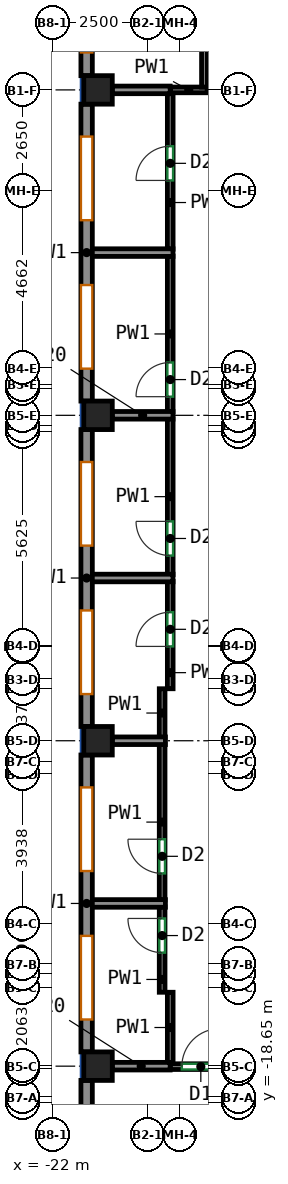
"""IFC4 building model, lengths in metres.
Left out: names, types, materials, properties, quantities, classifications, styles, units other than length and angle.
Written with IfcOpenShell. Run it as: python <this file> out.ifc"""

import sys

from ifc_helpers import new_model, si_unit, direction, frame, frame_2d, origin, origin_2d, place, context, subcontext, project, spatial, rectangle, extrude, source, transform, mapped, element, fill, save


model = new_model("IFC4")
c1 = context("Model", 3, precision=1e-05, world=origin(), true_north=direction((0.0, 1.0)))
c2 = subcontext(c1, "Body", "Model", "MODEL_VIEW")
j1 = project(units=[si_unit("LENGTHUNIT", "METRE"), si_unit("PLANEANGLEUNIT", "RADIAN")], contexts=[c1])
p1 = place(None, origin())
s1 = spatial("IfcSite", under=j1, at=p1, CompositionType="ELEMENT")
p2 = place(p1, origin())
s2 = spatial("IfcBuilding", under=s1, at=p2, CompositionType="ELEMENT")
p3 = place(p2, frame((0.0, 0.0, 213.5)))
s3 = spatial("IfcBuildingStorey", under=s2, at=p3, CompositionType="ELEMENT", Elevation=213.5)
m1 = source(origin(), c2, "Body", "SweptSolid", [
    extrude(rectangle(XDim=0.75, YDim=0.75, at=origin_2d()), origin(), (0.0, 0.0, 1.0), 3.12),
])
for number, where, z_axis, x_axis in (
    (1, (-20.8, -17.688, 0.0), (0.0, 0.0, 1.0), (1.0, 0.0, 0.0)),
    (2, (-20.8, -9.125, 0.0), (0.0, 0.0, 1.0), (1.0, 0.0, 0.0)),
    (3, (-20.8, -0.562, 0.0), (0.0, 0.0, 1.0), (1.0, 0.0, 0.0)),
    (4, (-20.8, 8.0, 0.0), (0.0, 0.0, 1.0), (1.0, 0.0, 0.0)),
):
    element("IfcColumn", number, at=place(p3, frame(where, z_axis=z_axis, x_axis=x_axis)), inside=s3, PredefinedType="COLUMN", context=c2, shape_type="MappedRepresentation", body=[
        mapped(m1, transform((0.0, 0.0, 0.0))),
    ])
m2 = source(origin(), c2, "Body", "SweptSolid", [
    extrude(rectangle(XDim=13.682, YDim=0.3, at=frame_2d((6.841, 0.0))), origin(), (0.0, 0.0, 1.0), 3.12),
])
p4 = place(p3, frame((-21.1, 22.057, 0.0), z_axis=(0.0, 0.0, 1.0), x_axis=(0.0, -1.0, 0.0)))
e5 = element("IfcWall", 5, at=p4, inside=s3, PredefinedType="SOLIDWALL", context=c2, shape_type="MappedRepresentation", body=[
    mapped(m2, transform((0.0, 0.0, 0.0))),
])
p5 = place(p4, frame((0.61, 0.0, 0.85)))
e6 = element("IfcOpeningElement", 6, at=p5, cuts=e5, PredefinedType="OPENING", context=c2, shape_type="SweptSolid", body=[
    extrude(rectangle(XDim=2.2, YDim=1.95, at=frame_2d((1.1, 0.975))), frame((0.0, 0.16, 0.0), z_axis=(0.0, -1.0, 0.0), x_axis=(1.0, 0.0, 0.0)), (0.0, 0.0, 1.0), 0.32),
])
p6 = place(p4, frame((4.031, 0.0, 0.85)))
e7 = element("IfcOpeningElement", 7, at=p6, cuts=e5, PredefinedType="OPENING", context=c2, shape_type="SweptSolid", body=[
    extrude(rectangle(XDim=2.2, YDim=1.95, at=frame_2d((1.1, 0.975))), frame((0.0, 0.16, 0.0), z_axis=(0.0, -1.0, 0.0), x_axis=(1.0, 0.0, 0.0)), (0.0, 0.0, 1.0), 0.32),
])
p7 = place(p4, frame((7.451, 0.0, 0.85)))
e8 = element("IfcOpeningElement", 8, at=p7, cuts=e5, PredefinedType="OPENING", context=c2, shape_type="SweptSolid", body=[
    extrude(rectangle(XDim=2.2, YDim=1.95, at=frame_2d((1.1, 0.975))), frame((0.0, 0.16, 0.0), z_axis=(0.0, -1.0, 0.0), x_axis=(1.0, 0.0, 0.0)), (0.0, 0.0, 1.0), 0.32),
])
p8 = place(p4, frame((10.872, 0.0, 0.85)))
e9 = element("IfcOpeningElement", 9, at=p8, cuts=e5, PredefinedType="OPENING", context=c2, shape_type="SweptSolid", body=[
    extrude(rectangle(XDim=2.2, YDim=1.95, at=frame_2d((1.1, 0.975))), frame((0.0, 0.16, 0.0), z_axis=(0.0, -1.0, 0.0), x_axis=(1.0, 0.0, 0.0)), (0.0, 0.0, 1.0), 0.32),
])
m3 = source(origin(), c2, "Body", "SweptSolid", [
    extrude(rectangle(XDim=7.812, YDim=0.3, at=frame_2d((3.906, 0.0))), origin(), (0.0, 0.0, 1.0), 3.12),
])
p9 = place(p3, frame((-21.1, 7.625, 0.0), z_axis=(0.0, 0.0, 1.0), x_axis=(0.0, -1.0, 0.0)))
e10 = element("IfcWall", 10, at=p9, inside=s3, PredefinedType="SOLIDWALL", context=c2, shape_type="MappedRepresentation", body=[
    mapped(m3, transform((0.0, 0.0, 0.0))),
])
p10 = place(p9, frame((0.853, 0.0, 0.85)))
e11 = element("IfcOpeningElement", 11, at=p10, cuts=e10, PredefinedType="OPENING", context=c2, shape_type="SweptSolid", body=[
    extrude(rectangle(XDim=2.2, YDim=1.95, at=frame_2d((1.1, 0.975))), frame((0.0, 0.16, 0.0), z_axis=(0.0, -1.0, 0.0), x_axis=(1.0, 0.0, 0.0)), (0.0, 0.0, 1.0), 0.32),
])
p11 = place(p9, frame((4.759, 0.0, 0.85)))
e12 = element("IfcOpeningElement", 12, at=p11, cuts=e10, PredefinedType="OPENING", context=c2, shape_type="SweptSolid", body=[
    extrude(rectangle(XDim=2.2, YDim=1.95, at=frame_2d((1.1, 0.975))), frame((0.0, 0.16, 0.0), z_axis=(0.0, -1.0, 0.0), x_axis=(1.0, 0.0, 0.0)), (0.0, 0.0, 1.0), 0.32),
])
p12 = place(p3, frame((-21.1, -0.938, 0.0), z_axis=(0.0, 0.0, 1.0), x_axis=(0.0, -1.0, 0.0)))
e13 = element("IfcWall", 13, at=p12, inside=s3, PredefinedType="SOLIDWALL", context=c2, shape_type="MappedRepresentation", body=[
    mapped(m3, transform((0.0, 0.0, 0.0))),
])
p13 = place(p12, frame((0.853, 0.0, 0.85)))
e14 = element("IfcOpeningElement", 14, at=p13, cuts=e13, PredefinedType="OPENING", context=c2, shape_type="SweptSolid", body=[
    extrude(rectangle(XDim=2.2, YDim=1.95, at=frame_2d((1.1, 0.975))), frame((0.0, 0.16, 0.0), z_axis=(0.0, -1.0, 0.0), x_axis=(1.0, 0.0, 0.0)), (0.0, 0.0, 1.0), 0.32),
])
p14 = place(p12, frame((4.76, 0.0, 0.85)))
e15 = element("IfcOpeningElement", 15, at=p14, cuts=e13, PredefinedType="OPENING", context=c2, shape_type="SweptSolid", body=[
    extrude(rectangle(XDim=2.2, YDim=1.95, at=frame_2d((1.1, 0.975))), frame((0.0, 0.16, 0.0), z_axis=(0.0, -1.0, 0.0), x_axis=(1.0, 0.0, 0.0)), (0.0, 0.0, 1.0), 0.32),
])
p15 = place(p3, frame((-21.1, -9.5, 0.0), z_axis=(0.0, 0.0, 1.0), x_axis=(0.0, -1.0, 0.0)))
e16 = element("IfcWall", 16, at=p15, inside=s3, PredefinedType="SOLIDWALL", context=c2, shape_type="MappedRepresentation", body=[
    mapped(m3, transform((0.0, 0.0, 0.0))),
])
p16 = place(p15, frame((0.853, 0.0, 0.85)))
e17 = element("IfcOpeningElement", 17, at=p16, cuts=e16, PredefinedType="OPENING", context=c2, shape_type="SweptSolid", body=[
    extrude(rectangle(XDim=2.2, YDim=1.95, at=frame_2d((1.1, 0.975))), frame((0.0, 0.16, 0.0), z_axis=(0.0, -1.0, 0.0), x_axis=(1.0, 0.0, 0.0)), (0.0, 0.0, 1.0), 0.32),
])
p17 = place(p15, frame((4.759, 0.0, 0.85)))
e18 = element("IfcOpeningElement", 18, at=p17, cuts=e16, PredefinedType="OPENING", context=c2, shape_type="SweptSolid", body=[
    extrude(rectangle(XDim=2.2, YDim=1.95, at=frame_2d((1.1, 0.975))), frame((0.0, 0.16, 0.0), z_axis=(0.0, -1.0, 0.0), x_axis=(1.0, 0.0, 0.0)), (0.0, 0.0, 1.0), 0.32),
])
m4 = source(origin(), c2, "Body", "SweptSolid", [
    extrude(rectangle(XDim=4.312, YDim=0.3, at=frame_2d((2.156, 0.0))), origin(), (0.0, 0.0, 1.0), 3.12),
])
p18 = place(p3, frame((-21.1, -18.062, 0.0), z_axis=(0.0, 0.0, 1.0), x_axis=(0.0, -1.0, 0.0)))
e19 = element("IfcWall", 19, at=p18, inside=s3, PredefinedType="SOLIDWALL", context=c2, shape_type="MappedRepresentation", body=[
    mapped(m4, transform((0.0, 0.0, 0.0))),
])
p19 = place(p18, frame((1.056, 0.0, 0.85)))
e20 = element("IfcOpeningElement", 20, at=p19, cuts=e19, PredefinedType="OPENING", context=c2, shape_type="SweptSolid", body=[
    extrude(rectangle(XDim=2.2, YDim=1.95, at=frame_2d((1.1, 0.975))), frame((0.0, 0.16, 0.0), z_axis=(0.0, -1.0, 0.0), x_axis=(1.0, 0.0, 0.0)), (0.0, 0.0, 1.0), 0.32),
])
p20 = place(p3, frame((-18.9, -17.7, 0.0), z_axis=(0.0, 0.0, 1.0), x_axis=(1.0, 0.0, 0.0)))
e21 = element("IfcWall", 21, at=p20, inside=s3, PredefinedType="PARTITIONING", context=c2, shape_type="SweptSolid", body=[
    extrude(rectangle(XDim=8.233, YDim=0.15, at=frame_2d((4.116, 0.0))), origin(), (0.0, 0.0, 1.0), 2.52),
])
p21 = place(p20, frame((0.305, 0.0, 0.0)))
e22 = element("IfcOpeningElement", 22, at=p21, cuts=e21, PredefinedType="OPENING", context=c2, shape_type="SweptSolid", body=[
    extrude(rectangle(XDim=1.0, YDim=2.1, at=frame_2d((0.5, 1.05))), frame((0.0, 0.085, 0.0), z_axis=(0.0, -1.0, 0.0), x_axis=(1.0, 0.0, 0.0)), (0.0, 0.0, 1.0), 0.17),
])
p22 = place(p20, frame((5.143, 0.0, 0.0)))
e23 = element("IfcOpeningElement", 23, at=p22, cuts=e21, PredefinedType="OPENING", context=c2, shape_type="SweptSolid", body=[
    extrude(rectangle(XDim=1.0, YDim=2.1, at=frame_2d((0.5, 1.05))), frame((0.0, 0.085, 0.0), z_axis=(0.0, -1.0, 0.0), x_axis=(1.0, 0.0, 0.0)), (0.0, 0.0, 1.0), 0.17),
])
p23 = place(p3, frame((-17.925, 8.0, 0.0), z_axis=(0.0, 0.0, 1.0), x_axis=(-1.0, 0.0, 0.0)))
e24 = element("IfcWall", 24, at=p23, inside=s3, PredefinedType="PARTITIONING", context=c2, shape_type="SweptSolid", body=[
    extrude(rectangle(XDim=0.976, YDim=0.15, at=frame_2d((0.488, 0.0))), origin(), (0.0, 0.0, 1.0), 3.12),
])
p24 = place(p3, frame((-18.0, 21.9, 0.0), z_axis=(0.0, 0.0, 1.0), x_axis=(0.0, -1.0, 0.0)))
e25 = element("IfcWall", 25, at=p24, inside=s3, PredefinedType="PARTITIONING", context=c2, shape_type="SweptSolid", body=[
    extrude(rectangle(XDim=13.825, YDim=0.15, at=frame_2d((6.913, 0.0))), origin(), (0.0, 0.0, 1.0), 3.12),
])
p25 = place(p24, frame((10.521, 0.0, 0.0)))
e26 = element("IfcOpeningElement", 26, at=p25, cuts=e25, PredefinedType="OPENING", context=c2, shape_type="SweptSolid", body=[
    extrude(rectangle(XDim=0.9, YDim=2.1, at=frame_2d((0.45, 1.05))), frame((0.0, 0.085, 0.0), z_axis=(0.0, -1.0, 0.0), x_axis=(1.0, 0.0, 0.0)), (0.0, 0.0, 1.0), 0.17),
])
p26 = place(p3, frame((-18.9, -17.598, 0.0), z_axis=(0.0, 0.0, 1.0), x_axis=(0.0, 1.0, 0.0)))
e27 = element("IfcWall", 27, at=p26, inside=s3, PredefinedType="PARTITIONING", context=c2, shape_type="SweptSolid", body=[
    extrude(rectangle(XDim=1.855, YDim=0.15, at=frame_2d((0.927, 0.0))), origin(), (0.0, 0.0, 1.0), 3.12),
])
p27 = place(p3, frame((-19.113, -15.743, 0.0), z_axis=(0.0, 0.0, 1.0), x_axis=(0.0, 1.0, 0.0)))
e28 = element("IfcWall", 28, at=p27, inside=s3, PredefinedType="PARTITIONING", context=c2, shape_type="SweptSolid", body=[
    extrude(rectangle(XDim=2.247, YDim=0.15, at=frame_2d((1.124, 0.0))), origin(), (0.0, 0.0, 1.0), 3.12),
])
p28 = place(p27, frame((1.042, 0.0, 0.0)))
e29 = element("IfcOpeningElement", 29, at=p28, cuts=e28, PredefinedType="OPENING", context=c2, shape_type="SweptSolid", body=[
    extrude(rectangle(XDim=0.9, YDim=2.1, at=frame_2d((0.45, 1.05))), frame((0.0, 0.085, 0.0), z_axis=(0.0, -1.0, 0.0), x_axis=(1.0, 0.0, 0.0)), (0.0, 0.0, 1.0), 0.17),
])
p29 = place(p3, frame((-19.113, -13.316, 0.0), z_axis=(0.0, 0.0, 1.0), x_axis=(0.0, 1.0, 0.0)))
e30 = element("IfcWall", 30, at=p29, inside=s3, PredefinedType="PARTITIONING", context=c2, shape_type="SweptSolid", body=[
    extrude(rectangle(XDim=4.101, YDim=0.15, at=frame_2d((2.05, 0.0))), origin(), (0.0, 0.0, 1.0), 3.12),
])
p30 = place(p29, frame((0.7, 0.0, 0.0)))
e31 = element("IfcOpeningElement", 31, at=p30, cuts=e30, PredefinedType="OPENING", context=c2, shape_type="SweptSolid", body=[
    extrude(rectangle(XDim=0.9, YDim=2.1, at=frame_2d((0.45, 1.05))), frame((0.0, 0.085, 0.0), z_axis=(0.0, -1.0, 0.0), x_axis=(1.0, 0.0, 0.0)), (0.0, 0.0, 1.0), 0.17),
])
p31 = place(p3, frame((-18.9, -7.757, 0.0), z_axis=(0.0, 0.0, 1.0), x_axis=(0.0, 1.0, 0.0)))
e32 = element("IfcWall", 32, at=p31, inside=s3, PredefinedType="PARTITIONING", context=c2, shape_type="SweptSolid", body=[
    extrude(rectangle(XDim=2.824, YDim=0.15, at=frame_2d((1.412, 0.0))), origin(), (0.0, 0.0, 1.0), 3.12),
])
p32 = place(p31, frame((1.114, 0.0, 0.0)))
e33 = element("IfcOpeningElement", 33, at=p32, cuts=e32, PredefinedType="OPENING", context=c2, shape_type="SweptSolid", body=[
    extrude(rectangle(XDim=0.9, YDim=2.1, at=frame_2d((0.45, 1.05))), frame((0.0, 0.085, 0.0), z_axis=(0.0, -1.0, 0.0), x_axis=(1.0, 0.0, 0.0)), (0.0, 0.0, 1.0), 0.17),
])
p33 = place(p3, frame((-19.113, -9.035, 0.0), z_axis=(0.0, 0.0, 1.0), x_axis=(0.0, 1.0, 0.0)))
e34 = element("IfcWall", 34, at=p33, inside=s3, PredefinedType="PARTITIONING", context=c2, shape_type="SweptSolid", body=[
    extrude(rectangle(XDim=1.278, YDim=0.15, at=frame_2d((0.639, 0.0))), origin(), (0.0, 0.0, 1.0), 3.12),
])
p34 = place(p3, frame((-18.9, -4.753, 0.0), z_axis=(0.0, 0.0, 1.0), x_axis=(0.0, 1.0, 0.0)))
e35 = element("IfcWall", 35, at=p34, inside=s3, PredefinedType="PARTITIONING", context=c2, shape_type="SweptSolid", body=[
    extrude(rectangle(XDim=4.101, YDim=0.15, at=frame_2d((2.05, 0.0))), origin(), (0.0, 0.0, 1.0), 3.12),
])
p35 = place(p34, frame((0.5, 0.0, 0.0)))
e36 = element("IfcOpeningElement", 36, at=p35, cuts=e35, PredefinedType="OPENING", context=c2, shape_type="SweptSolid", body=[
    extrude(rectangle(XDim=0.9, YDim=2.1, at=frame_2d((0.45, 1.05))), frame((0.0, 0.085, 0.0), z_axis=(0.0, -1.0, 0.0), x_axis=(1.0, 0.0, 0.0)), (0.0, 0.0, 1.0), 0.17),
])
p36 = place(p3, frame((-18.9, -0.472, 0.0), z_axis=(0.0, 0.0, 1.0), x_axis=(0.0, 1.0, 0.0)))
e37 = element("IfcWall", 37, at=p36, inside=s3, PredefinedType="PARTITIONING", context=c2, shape_type="SweptSolid", body=[
    extrude(rectangle(XDim=4.101, YDim=0.15, at=frame_2d((2.05, 0.0))), origin(), (0.0, 0.0, 1.0), 3.12),
])
p37 = place(p36, frame((0.4, 0.0, 0.0)))
e38 = element("IfcOpeningElement", 38, at=p37, cuts=e37, PredefinedType="OPENING", context=c2, shape_type="SweptSolid", body=[
    extrude(rectangle(XDim=0.9, YDim=2.1, at=frame_2d((0.45, 1.05))), frame((0.0, 0.085, 0.0), z_axis=(0.0, -1.0, 0.0), x_axis=(1.0, 0.0, 0.0)), (0.0, 0.0, 1.0), 0.17),
])
p38 = place(p3, frame((-18.9, 3.809, 0.0), z_axis=(0.0, 0.0, 1.0), x_axis=(0.0, 1.0, 0.0)))
e39 = element("IfcWall", 39, at=p38, inside=s3, PredefinedType="PARTITIONING", context=c2, shape_type="SweptSolid", body=[
    extrude(rectangle(XDim=4.092, YDim=0.15, at=frame_2d((2.046, 0.0))), origin(), (0.0, 0.0, 1.0), 3.12),
])
p39 = place(p38, frame((1.809, 0.0, 0.0)))
e40 = element("IfcOpeningElement", 40, at=p39, cuts=e39, PredefinedType="OPENING", context=c2, shape_type="SweptSolid", body=[
    extrude(rectangle(XDim=0.9, YDim=2.1, at=frame_2d((0.45, 1.05))), frame((0.0, 0.085, 0.0), z_axis=(0.0, -1.0, 0.0), x_axis=(1.0, 0.0, 0.0)), (0.0, 0.0, 1.0), 0.17),
])
p40 = place(p3, frame((-20.425, -17.688, 0.0), z_axis=(0.0, 0.0, 1.0), x_axis=(1.0, 0.0, 0.0)))
e41 = element("IfcWall", 41, at=p40, inside=s3, PredefinedType="PARTITIONING", context=c2, shape_type="SweptSolid", body=[
    extrude(rectangle(XDim=1.523, YDim=0.2, at=frame_2d((0.761, 0.0))), origin(), (0.0, 0.0, 1.0), 2.52),
])
p41 = place(p3, frame((-20.425, 8.0, 0.0), z_axis=(0.0, 0.0, 1.0), x_axis=(0.999999794741, 0.000640717472, 0.0)))
e42 = element("IfcWall", 42, at=p41, inside=s3, PredefinedType="PARTITIONING", context=c2, shape_type="SweptSolid", body=[
    extrude(rectangle(XDim=1.524, YDim=0.2, at=frame_2d((0.762, 0.0))), origin(), (0.0, 0.0, 1.0), 3.12),
])
p42 = place(p3, frame((-19.027, -13.406, 0.0), z_axis=(0.0, 0.0, 1.0), x_axis=(-1.0, 0.0, 0.0)))
e43 = element("IfcWall", 43, at=p42, inside=s3, PredefinedType="PARTITIONING", context=c2, shape_type="SweptSolid", body=[
    extrude(rectangle(XDim=1.973, YDim=0.2, at=frame_2d((0.986, 0.0))), origin(), (0.0, 0.0, 1.0), 3.12),
])
p43 = place(p3, frame((-20.425, -9.125, 0.0), z_axis=(0.0, 0.0, 1.0), x_axis=(1.0, 0.0, 0.0)))
e44 = element("IfcWall", 44, at=p43, inside=s3, PredefinedType="PARTITIONING", context=c2, shape_type="SweptSolid", body=[
    extrude(rectangle(XDim=1.398, YDim=0.2, at=frame_2d((0.699, 0.0))), origin(), (0.0, 0.0, 1.0), 3.12),
])
p44 = place(p3, frame((-21.0, -4.843, 0.0), z_axis=(0.0, 0.0, 1.0), x_axis=(1.0, 0.0, 0.0)))
e45 = element("IfcWall", 45, at=p44, inside=s3, PredefinedType="PARTITIONING", context=c2, shape_type="SweptSolid", body=[
    extrude(rectangle(XDim=2.173, YDim=0.2, at=frame_2d((1.086, 0.0))), origin(), (0.0, 0.0, 1.0), 3.12),
])
p45 = place(p3, frame((-18.827, -0.562, 0.0), z_axis=(0.0, 0.0, 1.0), x_axis=(-1.0, 0.0, 0.0)))
e46 = element("IfcWall", 46, at=p45, inside=s3, PredefinedType="PARTITIONING", context=c2, shape_type="SweptSolid", body=[
    extrude(rectangle(XDim=1.598, YDim=0.2, at=frame_2d((0.799, 0.0))), origin(), (0.0, 0.0, 1.0), 2.52),
])
p46 = place(p3, frame((-21.0, 3.719, 0.0), z_axis=(0.0, 0.0, 1.0), x_axis=(1.0, 0.0, 0.0)))
e47 = element("IfcWall", 47, at=p46, inside=s3, PredefinedType="PARTITIONING", context=c2, shape_type="SweptSolid", body=[
    extrude(rectangle(XDim=2.173, YDim=0.2, at=frame_2d((1.086, 0.0))), origin(), (0.0, 0.0, 1.0), 3.12),
])
p47 = place(p8, origin())
e48 = element("IfcWindow", 48, at=p47, inside=s3, PartitioningType="SINGLE_PANEL", PredefinedType="WINDOW", context=c2, shape_type="SweptSolid", body=[
    extrude(rectangle(XDim=2.2, YDim=1.95, at=frame_2d((1.1, 0.975))), frame((0.0, 0.03, 0.0), z_axis=(0.0, -1.0, 0.0), x_axis=(1.0, 0.0, 0.0)), (0.0, 0.0, 1.0), 0.06),
])
fill(e9, e48)
p48 = place(p10, origin())
e49 = element("IfcWindow", 49, at=p48, inside=s3, PartitioningType="SINGLE_PANEL", PredefinedType="WINDOW", context=c2, shape_type="SweptSolid", body=[
    extrude(rectangle(XDim=2.2, YDim=1.95, at=frame_2d((1.1, 0.975))), frame((0.0, 0.03, 0.0), z_axis=(0.0, -1.0, 0.0), x_axis=(1.0, 0.0, 0.0)), (0.0, 0.0, 1.0), 0.06),
])
fill(e11, e49)
p49 = place(p11, origin())
e50 = element("IfcWindow", 50, at=p49, inside=s3, PartitioningType="SINGLE_PANEL", PredefinedType="WINDOW", context=c2, shape_type="SweptSolid", body=[
    extrude(rectangle(XDim=2.2, YDim=1.95, at=frame_2d((1.1, 0.975))), frame((0.0, 0.03, 0.0), z_axis=(0.0, -1.0, 0.0), x_axis=(1.0, 0.0, 0.0)), (0.0, 0.0, 1.0), 0.06),
])
fill(e12, e50)
p50 = place(p13, origin())
e51 = element("IfcWindow", 51, at=p50, inside=s3, PartitioningType="SINGLE_PANEL", PredefinedType="WINDOW", context=c2, shape_type="SweptSolid", body=[
    extrude(rectangle(XDim=2.2, YDim=1.95, at=frame_2d((1.1, 0.975))), frame((0.0, 0.03, 0.0), z_axis=(0.0, -1.0, 0.0), x_axis=(1.0, 0.0, 0.0)), (0.0, 0.0, 1.0), 0.06),
])
fill(e14, e51)
p51 = place(p14, origin())
e52 = element("IfcWindow", 52, at=p51, inside=s3, PartitioningType="SINGLE_PANEL", PredefinedType="WINDOW", context=c2, shape_type="SweptSolid", body=[
    extrude(rectangle(XDim=2.2, YDim=1.95, at=frame_2d((1.1, 0.975))), frame((0.0, 0.03, 0.0), z_axis=(0.0, -1.0, 0.0), x_axis=(1.0, 0.0, 0.0)), (0.0, 0.0, 1.0), 0.06),
])
fill(e15, e52)
p52 = place(p16, origin())
e53 = element("IfcWindow", 53, at=p52, inside=s3, PartitioningType="SINGLE_PANEL", PredefinedType="WINDOW", context=c2, shape_type="SweptSolid", body=[
    extrude(rectangle(XDim=2.2, YDim=1.95, at=frame_2d((1.1, 0.975))), frame((0.0, 0.03, 0.0), z_axis=(0.0, -1.0, 0.0), x_axis=(1.0, 0.0, 0.0)), (0.0, 0.0, 1.0), 0.06),
])
fill(e17, e53)
p53 = place(p17, origin())
e54 = element("IfcWindow", 54, at=p53, inside=s3, PartitioningType="SINGLE_PANEL", PredefinedType="WINDOW", context=c2, shape_type="SweptSolid", body=[
    extrude(rectangle(XDim=2.2, YDim=1.95, at=frame_2d((1.1, 0.975))), frame((0.0, 0.03, 0.0), z_axis=(0.0, -1.0, 0.0), x_axis=(1.0, 0.0, 0.0)), (0.0, 0.0, 1.0), 0.06),
])
fill(e18, e54)
p54 = place(p21, origin())
e55 = element("IfcDoor", 55, at=p54, inside=s3, OperationType="SINGLE_SWING_RIGHT", PredefinedType="DOOR", context=c2, shape_type="SweptSolid", body=[
    extrude(rectangle(XDim=1.0, YDim=2.1, at=frame_2d((0.5, 1.05))), frame((0.0, 0.025, 0.0), z_axis=(0.0, -1.0, 0.0), x_axis=(1.0, 0.0, 0.0)), (0.0, 0.0, 1.0), 0.05),
])
fill(e22, e55)
p55 = place(p28, origin())
e56 = element("IfcDoor", 56, at=p55, inside=s3, OperationType="SINGLE_SWING_RIGHT", PredefinedType="DOOR", context=c2, shape_type="SweptSolid", body=[
    extrude(rectangle(XDim=0.9, YDim=2.1, at=frame_2d((0.45, 1.05))), frame((0.0, 0.025, 0.0), z_axis=(0.0, -1.0, 0.0), x_axis=(1.0, 0.0, 0.0)), (0.0, 0.0, 1.0), 0.05),
])
fill(e29, e56)
p56 = place(p30, origin())
e57 = element("IfcDoor", 57, at=p56, inside=s3, OperationType="SINGLE_SWING_RIGHT", PredefinedType="DOOR", context=c2, shape_type="SweptSolid", body=[
    extrude(rectangle(XDim=0.9, YDim=2.1, at=frame_2d((0.45, 1.05))), frame((0.0, 0.025, 0.0), z_axis=(0.0, -1.0, 0.0), x_axis=(1.0, 0.0, 0.0)), (0.0, 0.0, 1.0), 0.05),
])
fill(e31, e57)
p57 = place(p32, origin())
e58 = element("IfcDoor", 58, at=p57, inside=s3, OperationType="SINGLE_SWING_LEFT", PredefinedType="DOOR", context=c2, shape_type="SweptSolid", body=[
    extrude(rectangle(XDim=0.9, YDim=2.1, at=frame_2d((0.45, 1.05))), frame((0.0, 0.025, 0.0), z_axis=(0.0, -1.0, 0.0), x_axis=(1.0, 0.0, 0.0)), (0.0, 0.0, 1.0), 0.05),
])
fill(e33, e58)
p58 = place(p35, origin())
e59 = element("IfcDoor", 59, at=p58, inside=s3, OperationType="SINGLE_SWING_RIGHT", PredefinedType="DOOR", context=c2, shape_type="SweptSolid", body=[
    extrude(rectangle(XDim=0.9, YDim=2.1, at=frame_2d((0.45, 1.05))), frame((0.0, 0.025, 0.0), z_axis=(0.0, -1.0, 0.0), x_axis=(1.0, 0.0, 0.0)), (0.0, 0.0, 1.0), 0.05),
])
fill(e36, e59)
p59 = place(p37, origin())
e60 = element("IfcDoor", 60, at=p59, inside=s3, OperationType="SINGLE_SWING_LEFT", PredefinedType="DOOR", context=c2, shape_type="SweptSolid", body=[
    extrude(rectangle(XDim=0.9, YDim=2.1, at=frame_2d((0.45, 1.05))), frame((0.0, 0.025, 0.0), z_axis=(0.0, -1.0, 0.0), x_axis=(1.0, 0.0, 0.0)), (0.0, 0.0, 1.0), 0.05),
])
fill(e38, e60)
p60 = place(p39, origin())
e61 = element("IfcDoor", 61, at=p60, inside=s3, OperationType="SINGLE_SWING_LEFT", PredefinedType="DOOR", context=c2, shape_type="SweptSolid", body=[
    extrude(rectangle(XDim=0.9, YDim=2.1, at=frame_2d((0.45, 1.05))), frame((0.0, 0.025, 0.0), z_axis=(0.0, -1.0, 0.0), x_axis=(1.0, 0.0, 0.0)), (0.0, 0.0, 1.0), 0.05),
])
fill(e40, e61)
save(model, sys.argv[1])
